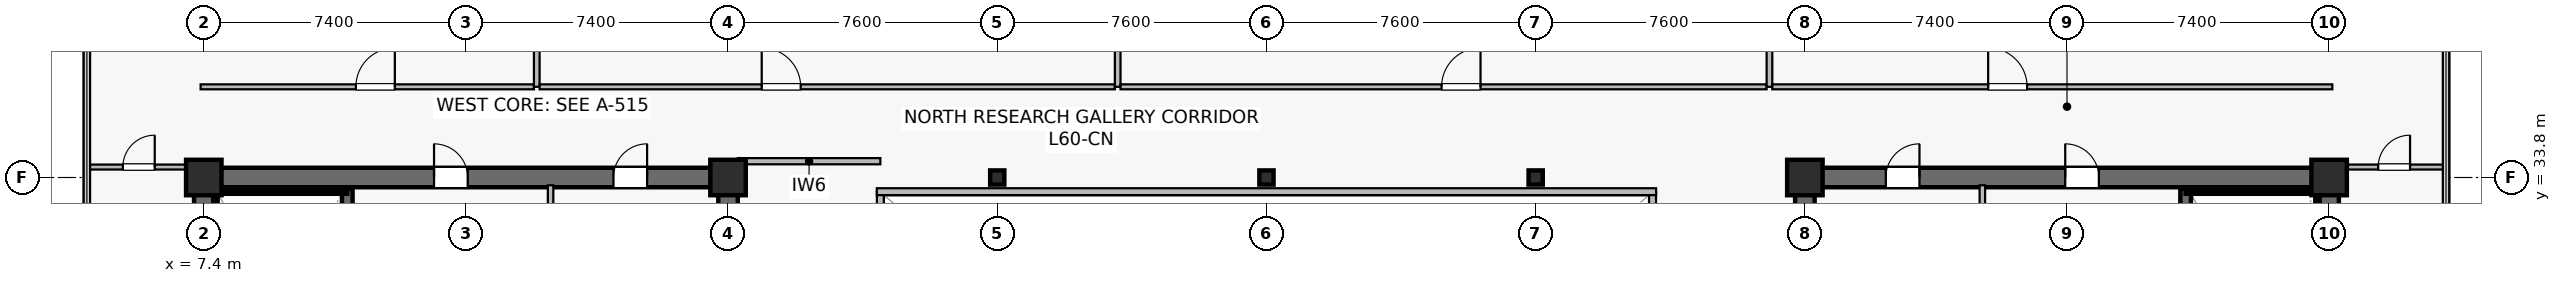
"""IFC4 building model, lengths in metres.
Left out: names, types, materials, properties, quantities, classifications, styles, units other than length and angle.
Written with IfcOpenShell. Run it as: python <this file> out.ifc"""

import sys

from ifc_helpers import new_model, si_unit, direction, frame, frame_2d, origin, origin_2d, place, context, subcontext, project, spatial, rectangle, hollow_rectangle, extrude, source, transform, mapped, element, fill, save


model = new_model("IFC4")
c1 = context("Model", 3, precision=1e-05, world=origin(), true_north=direction((0.0, 1.0)))
c2 = subcontext(c1, "Body", "Model", "MODEL_VIEW")
j1 = project(units=[si_unit("LENGTHUNIT", "METRE"), si_unit("PLANEANGLEUNIT", "RADIAN")], contexts=[c1])
p1 = place(None, origin())
s1 = spatial("IfcSite", under=j1, at=p1, CompositionType="ELEMENT")
p2 = place(p1, origin())
s2 = spatial("IfcBuilding", under=s1, at=p2, CompositionType="ELEMENT")
p3 = place(p2, frame((0.0, 0.0, 250.6)))
s3 = spatial("IfcBuildingStorey", under=s2, at=p3, CompositionType="ELEMENT", Elevation=250.6)
p4 = place(p3, frame((7.125, 33.8, 0.0), z_axis=(0.0, 0.0, 1.0), x_axis=(1.0, 0.0, 0.0)))
e1 = element("IfcWall", 1, at=p4, inside=s3, PredefinedType="SHEAR", context=c2, shape_type="SweptSolid", body=[
    extrude(rectangle(XDim=15.35, YDim=0.55, at=frame_2d((7.675, 0.0))), origin(), (0.0, 0.0, 1.0), 3.8),
])
p5 = place(p4, frame((6.775, 0.0, 0.0)))
e2 = element("IfcOpeningElement", 2, at=p5, cuts=e1, PredefinedType="OPENING", context=c2, shape_type="SweptSolid", body=[
    extrude(rectangle(XDim=0.95, YDim=2.15, at=frame_2d((0.475, 1.075))), frame((0.0, 0.285, 0.0), z_axis=(0.0, -1.0, 0.0), x_axis=(1.0, 0.0, 0.0)), (0.0, 0.0, 1.0), 0.57),
])
p6 = place(p4, frame((11.84, 0.0, 0.0)))
e3 = element("IfcOpeningElement", 3, at=p6, cuts=e1, PredefinedType="OPENING", context=c2, shape_type="SweptSolid", body=[
    extrude(rectangle(XDim=0.95, YDim=2.15, at=frame_2d((0.475, 1.075))), frame((0.0, 0.285, 0.0), z_axis=(0.0, -1.0, 0.0), x_axis=(1.0, 0.0, 0.0)), (0.0, 0.0, 1.0), 0.57),
])
p7 = place(p3, frame((7.4, 15.075, 0.0), z_axis=(0.0, 0.0, 1.0), x_axis=(0.0, 1.0, 0.0)))
e4 = element("IfcWall", 4, at=p7, inside=s3, PredefinedType="SHEAR", context=c2, shape_type="SweptSolid", body=[
    extrude(rectangle(XDim=18.45, YDim=0.55, at=frame_2d((9.225, 0.0))), origin(), (0.0, 0.0, 1.0), 3.8),
])
p8 = place(p3, frame((22.2, 15.075, 0.0), z_axis=(0.0, 0.0, 1.0), x_axis=(0.0, 1.0, 0.0)))
e5 = element("IfcWall", 5, at=p8, inside=s3, PredefinedType="SHEAR", context=c2, shape_type="SweptSolid", body=[
    extrude(rectangle(XDim=18.45, YDim=0.55, at=frame_2d((9.225, 0.0))), origin(), (0.0, 0.0, 1.0), 3.8),
])
p9 = place(p8, frame((3.475, 0.0, 0.0)))
e6 = element("IfcOpeningElement", 6, at=p9, cuts=e5, PredefinedType="OPENING", context=c2, shape_type="SweptSolid", body=[
    extrude(rectangle(XDim=1.42, YDim=2.2, at=frame_2d((0.71, 1.1))), frame((0.0, 0.285, 0.0), z_axis=(0.0, -1.0, 0.0), x_axis=(1.0, 0.0, 0.0)), (0.0, 0.0, 1.0), 0.57),
])
p10 = place(p3, frame((11.45, 24.85, 0.0), z_axis=(0.0, 0.0, 1.0), x_axis=(0.0, 1.0, 0.0)))
e7 = element("IfcWall", 7, at=p10, inside=s3, PredefinedType="SHEAR", context=c2, shape_type="SweptSolid", body=[
    extrude(rectangle(XDim=8.63, YDim=0.3, at=frame_2d((4.315, 0.0))), origin(), (0.0, 0.0, 1.0), 3.8),
])
p11 = place(p10, frame((0.42, 0.0, 0.0)))
e8 = element("IfcOpeningElement", 8, at=p11, cuts=e7, PredefinedType="OPENING", context=c2, shape_type="SweptSolid", body=[
    extrude(rectangle(XDim=1.1, YDim=2.15, at=frame_2d((0.55, 1.075))), frame((0.0, 0.16, 0.0), z_axis=(0.0, -1.0, 0.0), x_axis=(1.0, 0.0, 0.0)), (0.0, 0.0, 1.0), 0.32),
])
p12 = place(p3, frame((7.73, 33.4, 0.0), z_axis=(0.0, 0.0, 1.0), x_axis=(1.0, 0.0, 0.0)))
e9 = element("IfcWall", 9, at=p12, inside=s3, PredefinedType="SOLIDWALL", context=c2, shape_type="SweptSolid", body=[
    extrude(rectangle(XDim=3.72, YDim=0.12, at=frame_2d((1.86, 0.0))), origin(), (0.0, 0.0, 1.0), 3.8),
])
p13 = place(p3, frame((7.73, 25.0, 0.0), z_axis=(0.0, 0.0, 1.0), x_axis=(0.0, 1.0, 0.0)))
e10 = element("IfcWall", 10, at=p13, inside=s3, PredefinedType="SOLIDWALL", context=c2, shape_type="SweptSolid", body=[
    extrude(rectangle(XDim=8.32, YDim=0.12, at=frame_2d((4.16, 0.0))), origin(), (0.0, 0.0, 1.0), 3.8),
])
p14 = place(p3, frame((52.325, 33.8, 0.0), z_axis=(0.0, 0.0, 1.0), x_axis=(1.0, 0.0, 0.0)))
e11 = element("IfcWall", 11, at=p14, inside=s3, PredefinedType="SHEAR", context=c2, shape_type="SweptSolid", body=[
    extrude(rectangle(XDim=15.35, YDim=0.55, at=frame_2d((7.675, 0.0))), origin(), (0.0, 0.0, 1.0), 3.8),
])
p15 = place(p14, frame((7.625, 0.0, 0.0)))
e12 = element("IfcOpeningElement", 12, at=p15, cuts=e11, PredefinedType="OPENING", context=c2, shape_type="SweptSolid", body=[
    extrude(rectangle(XDim=0.95, YDim=2.15, at=frame_2d((0.475, 1.075))), frame((0.0, 0.285, 0.0), z_axis=(0.0, -1.0, 0.0), x_axis=(1.0, 0.0, 0.0)), (0.0, 0.0, 1.0), 0.57),
])
p16 = place(p14, frame((2.56, 0.0, 0.0)))
e13 = element("IfcOpeningElement", 13, at=p16, cuts=e11, PredefinedType="OPENING", context=c2, shape_type="SweptSolid", body=[
    extrude(rectangle(XDim=0.95, YDim=2.15, at=frame_2d((0.475, 1.075))), frame((0.0, 0.285, 0.0), z_axis=(0.0, -1.0, 0.0), x_axis=(1.0, 0.0, 0.0)), (0.0, 0.0, 1.0), 0.57),
])
p17 = place(p3, frame((52.6, 15.075, 0.0), z_axis=(0.0, 0.0, 1.0), x_axis=(0.0, 1.0, 0.0)))
e14 = element("IfcWall", 14, at=p17, inside=s3, PredefinedType="SHEAR", context=c2, shape_type="SweptSolid", body=[
    extrude(rectangle(XDim=18.45, YDim=0.55, at=frame_2d((9.225, 0.0))), origin(), (0.0, 0.0, 1.0), 3.8),
])
p18 = place(p17, frame((3.475, 0.0, 0.0)))
e15 = element("IfcOpeningElement", 15, at=p18, cuts=e14, PredefinedType="OPENING", context=c2, shape_type="SweptSolid", body=[
    extrude(rectangle(XDim=1.42, YDim=2.2, at=frame_2d((0.71, 1.1))), frame((0.0, 0.285, 0.0), z_axis=(0.0, -1.0, 0.0), x_axis=(1.0, 0.0, 0.0)), (0.0, 0.0, 1.0), 0.57),
])
p19 = place(p3, frame((67.4, 15.075, 0.0), z_axis=(0.0, 0.0, 1.0), x_axis=(0.0, 1.0, 0.0)))
e16 = element("IfcWall", 16, at=p19, inside=s3, PredefinedType="SHEAR", context=c2, shape_type="SweptSolid", body=[
    extrude(rectangle(XDim=18.45, YDim=0.55, at=frame_2d((9.225, 0.0))), origin(), (0.0, 0.0, 1.0), 3.8),
])
p20 = place(p3, frame((63.35, 24.85, 0.0), z_axis=(0.0, 0.0, 1.0), x_axis=(0.0, 1.0, 0.0)))
e17 = element("IfcWall", 17, at=p20, inside=s3, PredefinedType="SHEAR", context=c2, shape_type="SweptSolid", body=[
    extrude(rectangle(XDim=8.63, YDim=0.3, at=frame_2d((4.315, 0.0))), origin(), (0.0, 0.0, 1.0), 3.8),
])
p21 = place(p20, frame((0.42, 0.0, 0.0)))
e18 = element("IfcOpeningElement", 18, at=p21, cuts=e17, PredefinedType="OPENING", context=c2, shape_type="SweptSolid", body=[
    extrude(rectangle(XDim=1.1, YDim=2.15, at=frame_2d((0.55, 1.075))), frame((0.0, 0.16, 0.0), z_axis=(0.0, -1.0, 0.0), x_axis=(1.0, 0.0, 0.0)), (0.0, 0.0, 1.0), 0.32),
])
p22 = place(p3, frame((63.35, 33.4, 0.0), z_axis=(0.0, 0.0, 1.0), x_axis=(1.0, 0.0, 0.0)))
e19 = element("IfcWall", 19, at=p22, inside=s3, PredefinedType="SOLIDWALL", context=c2, shape_type="SweptSolid", body=[
    extrude(rectangle(XDim=3.72, YDim=0.12, at=frame_2d((1.86, 0.0))), origin(), (0.0, 0.0, 1.0), 3.8),
])
p23 = place(p3, frame((67.07, 25.0, 0.0), z_axis=(0.0, 0.0, 1.0), x_axis=(0.0, 1.0, 0.0)))
e20 = element("IfcWall", 20, at=p23, inside=s3, PredefinedType="SOLIDWALL", context=c2, shape_type="SweptSolid", body=[
    extrude(rectangle(XDim=8.32, YDim=0.12, at=frame_2d((4.16, 0.0))), origin(), (0.0, 0.0, 1.0), 3.8),
])
m1 = source(origin(), c2, "Body", "SweptSolid", [
    extrude(rectangle(XDim=1.0, YDim=1.0, at=origin_2d()), origin(), (0.0, 0.0, 1.0), 4.1),
])
for number, where, z_axis, x_axis in (
    (21, (7.4, 33.8, 0.0), (0.0, 0.0, 1.0), (1.0, 0.0, 0.0)),
    (22, (22.2, 33.8, 0.0), (0.0, 0.0, 1.0), (1.0, 0.0, 0.0)),
    (23, (52.6, 33.8, 0.0), (0.0, 0.0, 1.0), (1.0, 0.0, 0.0)),
    (24, (67.4, 33.8, 0.0), (0.0, 0.0, 1.0), (1.0, 0.0, 0.0)),
):
    element("IfcColumn", number, at=place(p3, frame(where, z_axis=z_axis, x_axis=x_axis)), inside=s3, PredefinedType="COLUMN", context=c2, shape_type="MappedRepresentation", body=[
        mapped(m1, transform((0.0, 0.0, 0.0), scale=1.0)),
    ])
m2 = source(origin(), c2, "Body", "SweptSolid", [
    extrude(hollow_rectangle(XDim=0.4, YDim=0.4, WallThickness=0.019, at=origin_2d()), origin(), (0.0, 0.0, 1.0), 4.1),
])
for number, where, z_axis, x_axis in (
    (25, (29.8, 33.8, 0.0), (0.0, 0.0, 1.0), (1.0, 0.0, 0.0)),
    (26, (37.4, 33.8, 0.0), (0.0, 0.0, 1.0), (1.0, 0.0, 0.0)),
    (27, (45.0, 33.8, 0.0), (0.0, 0.0, 1.0), (1.0, 0.0, 0.0)),
):
    element("IfcColumn", number, at=place(p3, frame(where, z_axis=z_axis, x_axis=x_axis)), inside=s3, PredefinedType="COLUMN", context=c2, shape_type="MappedRepresentation", body=[
        mapped(m2, transform((0.0, 0.0, 0.0), scale=1.0)),
    ])
for number, where, z_axis, x_axis in (
    (28, (17.19, 29.65, 0.0), (0.0, 0.0, 1.0), (0.0, 1.0, 0.0)),
    (29, (57.61, 29.65, 0.0), (0.0, 0.0, 1.0), (0.0, 1.0, 0.0)),
):
    element("IfcWall", number, at=place(p3, frame(where, z_axis=z_axis, x_axis=x_axis)), inside=s3, PredefinedType="PLUMBINGWALL", context=c2, shape_type="SweptSolid", body=[
        extrude(rectangle(XDim=3.93, YDim=0.155, at=frame_2d((1.965, 0.0))), origin(), (0.0, 0.0, 1.0), 3.8),
    ])
p24 = place(p3, frame((22.475, 34.26, 0.0), z_axis=(0.0, 0.0, 1.0), x_axis=(1.0, 0.0, 0.0)))
e30 = element("IfcWall", 30, at=p24, inside=s3, PredefinedType="PARTITIONING", context=c2, shape_type="SweptSolid", body=[
    extrude(rectangle(XDim=4.025, YDim=0.175, at=frame_2d((2.012, 0.0))), origin(), (0.0, 0.0, 1.0), 3.535),
])
p25 = place(p3, frame((26.5, 15.2, 0.0), z_axis=(0.0, 0.0, 1.0), x_axis=(0.0, 1.0, 0.0)))
e31 = element("IfcWall", 31, at=p25, inside=s3, PredefinedType="SOLIDWALL", context=c2, shape_type="SweptSolid", body=[
    extrude(rectangle(XDim=18.2, YDim=0.195, at=frame_2d((9.1, 0.0))), origin(), (0.0, 0.0, 1.0), 3.8),
])
p26 = place(p25, frame((1.8, 0.0, 0.9)))
e32 = element("IfcOpeningElement", 32, at=p26, cuts=e31, PredefinedType="OPENING", context=c2, shape_type="SweptSolid", body=[
    extrude(rectangle(XDim=1.5, YDim=1.4, at=frame_2d((0.75, 0.7))), frame((0.0, 0.107, 0.0), z_axis=(0.0, -1.0, 0.0), x_axis=(1.0, 0.0, 0.0)), (0.0, 0.0, 1.0), 0.215),
])
p27 = place(p25, frame((13.2, 0.0, 0.9)))
e33 = element("IfcOpeningElement", 33, at=p27, cuts=e31, PredefinedType="OPENING", context=c2, shape_type="SweptSolid", body=[
    extrude(rectangle(XDim=1.5, YDim=1.4, at=frame_2d((0.75, 0.7))), frame((0.0, 0.107, 0.0), z_axis=(0.0, -1.0, 0.0), x_axis=(1.0, 0.0, 0.0)), (0.0, 0.0, 1.0), 0.215),
])
p28 = place(p3, frame((48.3, 15.2, 0.0), z_axis=(0.0, 0.0, 1.0), x_axis=(0.0, 1.0, 0.0)))
e34 = element("IfcWall", 34, at=p28, inside=s3, PredefinedType="SOLIDWALL", context=c2, shape_type="SweptSolid", body=[
    extrude(rectangle(XDim=18.2, YDim=0.195, at=frame_2d((9.1, 0.0))), origin(), (0.0, 0.0, 1.0), 3.8),
])
p29 = place(p28, frame((1.8, 0.0, 0.9)))
e35 = element("IfcOpeningElement", 35, at=p29, cuts=e34, PredefinedType="OPENING", context=c2, shape_type="SweptSolid", body=[
    extrude(rectangle(XDim=1.5, YDim=1.4, at=frame_2d((0.75, 0.7))), frame((0.0, 0.107, 0.0), z_axis=(0.0, -1.0, 0.0), x_axis=(1.0, 0.0, 0.0)), (0.0, 0.0, 1.0), 0.215),
])
p30 = place(p28, frame((13.2, 0.0, 0.9)))
e36 = element("IfcOpeningElement", 36, at=p30, cuts=e34, PredefinedType="OPENING", context=c2, shape_type="SweptSolid", body=[
    extrude(rectangle(XDim=1.5, YDim=1.4, at=frame_2d((0.75, 0.7))), frame((0.0, 0.107, 0.0), z_axis=(0.0, -1.0, 0.0), x_axis=(1.0, 0.0, 0.0)), (0.0, 0.0, 1.0), 0.215),
])
p31 = place(p3, frame((26.4, 33.4, 0.0), z_axis=(0.0, 0.0, 1.0), x_axis=(1.0, 0.0, 0.0)))
e37 = element("IfcWall", 37, at=p31, inside=s3, PredefinedType="SOLIDWALL", context=c2, shape_type="SweptSolid", body=[
    extrude(rectangle(XDim=22.0, YDim=0.195, at=frame_2d((11.0, 0.0))), origin(), (0.0, 0.0, 1.0), 3.8),
])
p32 = place(p3, frame((7.31, 36.36, 0.0), z_axis=(0.0, 0.0, 1.0), x_axis=(1.0, 0.0, 0.0)))
e38 = element("IfcWall", 38, at=p32, inside=s3, PredefinedType="PARTITIONING", context=c2, shape_type="SweptSolid", body=[
    extrude(rectangle(XDim=9.41, YDim=0.14, at=frame_2d((4.705, 0.0))), origin(), (0.0, 0.0, 1.0), 3.197),
])
p33 = place(p32, frame((4.383, 0.0, 0.0)))
e39 = element("IfcOpeningElement", 39, at=p33, cuts=e38, PredefinedType="OPENING", context=c2, shape_type="SweptSolid", body=[
    extrude(rectangle(XDim=1.1, YDim=2.18, at=frame_2d((0.55, 1.09))), frame((0.0, 0.08, 0.0), z_axis=(0.0, -1.0, 0.0), x_axis=(1.0, 0.0, 0.0)), (0.0, 0.0, 1.0), 0.16),
])
p34 = place(p3, frame((16.8, 36.36, 0.0), z_axis=(0.0, 0.0, 1.0), x_axis=(0.0, 1.0, 0.0)))
e40 = element("IfcWall", 40, at=p34, inside=s3, PredefinedType="PARTITIONING", context=c2, shape_type="SweptSolid", body=[
    extrude(rectangle(XDim=9.53, YDim=0.16, at=frame_2d((4.765, 0.0))), origin(), (0.0, 0.0, 1.0), 3.135),
])
p35 = place(p3, frame((16.88, 36.36, 0.0), z_axis=(0.0, 0.0, 1.0), x_axis=(1.0, 0.0, 0.0)))
e41 = element("IfcWall", 41, at=p35, inside=s3, PredefinedType="PARTITIONING", context=c2, shape_type="SweptSolid", body=[
    extrude(rectangle(XDim=16.24, YDim=0.14, at=frame_2d((8.12, 0.0))), origin(), (0.0, 0.0, 1.0), 3.197),
])
p36 = place(p35, frame((6.271, 0.0, 0.0)))
e42 = element("IfcOpeningElement", 42, at=p36, cuts=e41, PredefinedType="OPENING", context=c2, shape_type="SweptSolid", body=[
    extrude(rectangle(XDim=1.1, YDim=2.18, at=frame_2d((0.55, 1.09))), frame((0.0, 0.08, 0.0), z_axis=(0.0, -1.0, 0.0), x_axis=(1.0, 0.0, 0.0)), (0.0, 0.0, 1.0), 0.16),
])
p37 = place(p3, frame((33.2, 36.36, 0.0), z_axis=(0.0, 0.0, 1.0), x_axis=(0.0, 1.0, 0.0)))
e43 = element("IfcWall", 43, at=p37, inside=s3, PredefinedType="PARTITIONING", context=c2, shape_type="SweptSolid", body=[
    extrude(rectangle(XDim=8.33, YDim=0.16, at=frame_2d((4.165, 0.0))), origin(), (0.0, 0.0, 1.0), 3.135),
])
p38 = place(p3, frame((33.28, 36.36, 0.0), z_axis=(0.0, 0.0, 1.0), x_axis=(1.0, 0.0, 0.0)))
e44 = element("IfcWall", 44, at=p38, inside=s3, PredefinedType="PARTITIONING", context=c2, shape_type="SweptSolid", body=[
    extrude(rectangle(XDim=18.24, YDim=0.14, at=frame_2d((9.12, 0.0))), origin(), (0.0, 0.0, 1.0), 3.197),
])
p39 = place(p38, frame((9.063, 0.0, 0.0)))
e45 = element("IfcOpeningElement", 45, at=p39, cuts=e44, PredefinedType="OPENING", context=c2, shape_type="SweptSolid", body=[
    extrude(rectangle(XDim=1.1, YDim=2.18, at=frame_2d((0.55, 1.09))), frame((0.0, 0.08, 0.0), z_axis=(0.0, -1.0, 0.0), x_axis=(1.0, 0.0, 0.0)), (0.0, 0.0, 1.0), 0.16),
])
p40 = place(p3, frame((51.6, 36.36, 0.0), z_axis=(0.0, 0.0, 1.0), x_axis=(0.0, 1.0, 0.0)))
e46 = element("IfcWall", 46, at=p40, inside=s3, PredefinedType="PARTITIONING", context=c2, shape_type="SweptSolid", body=[
    extrude(rectangle(XDim=9.53, YDim=0.16, at=frame_2d((4.765, 0.0))), origin(), (0.0, 0.0, 1.0), 3.135),
])
p41 = place(p3, frame((51.68, 36.36, 0.0), z_axis=(0.0, 0.0, 1.0), x_axis=(1.0, 0.0, 0.0)))
e47 = element("IfcWall", 47, at=p41, inside=s3, PredefinedType="PARTITIONING", context=c2, shape_type="SweptSolid", body=[
    extrude(rectangle(XDim=15.81, YDim=0.14, at=frame_2d((7.905, 0.0))), origin(), (0.0, 0.0, 1.0), 3.197),
])
p42 = place(p41, frame((6.094, 0.0, 0.0)))
e48 = element("IfcOpeningElement", 48, at=p42, cuts=e47, PredefinedType="OPENING", context=c2, shape_type="SweptSolid", body=[
    extrude(rectangle(XDim=1.1, YDim=2.18, at=frame_2d((0.55, 1.09))), frame((0.0, 0.08, 0.0), z_axis=(0.0, -1.0, 0.0), x_axis=(1.0, 0.0, 0.0)), (0.0, 0.0, 1.0), 0.16),
])
p43 = place(p3, frame((4.11, 34.095, 0.0), z_axis=(0.0, 0.0, 1.0), x_axis=(1.0, 0.0, 0.0)))
e49 = element("IfcWall", 49, at=p43, inside=s3, PredefinedType="PARTITIONING", context=c2, shape_type="SweptSolid", body=[
    extrude(rectangle(XDim=2.91, YDim=0.14, at=frame_2d((1.455, 0.0))), origin(), (0.0, 0.0, 1.0), 3.8),
])
p44 = place(p43, frame((1.005, 0.0, 0.0)))
e50 = element("IfcOpeningElement", 50, at=p44, cuts=e49, PredefinedType="OPENING", context=c2, shape_type="SweptSolid", body=[
    extrude(rectangle(XDim=0.9, YDim=2.1, at=frame_2d((0.45, 1.05))), frame((0.0, 0.08, 0.0), z_axis=(0.0, -1.0, 0.0), x_axis=(1.0, 0.0, 0.0)), (0.0, 0.0, 1.0), 0.16),
])
p45 = place(p3, frame((67.78, 34.095, 0.0), z_axis=(0.0, 0.0, 1.0), x_axis=(1.0, 0.0, 0.0)))
e51 = element("IfcWall", 51, at=p45, inside=s3, PredefinedType="PARTITIONING", context=c2, shape_type="SweptSolid", body=[
    extrude(rectangle(XDim=2.91, YDim=0.14, at=frame_2d((1.455, 0.0))), origin(), (0.0, 0.0, 1.0), 3.8),
])
p46 = place(p45, frame((1.005, 0.0, 0.0)))
e52 = element("IfcOpeningElement", 52, at=p46, cuts=e51, PredefinedType="OPENING", context=c2, shape_type="SweptSolid", body=[
    extrude(rectangle(XDim=0.9, YDim=2.1, at=frame_2d((0.45, 1.05))), frame((0.0, 0.08, 0.0), z_axis=(0.0, -1.0, 0.0), x_axis=(1.0, 0.0, 0.0)), (0.0, 0.0, 1.0), 0.16),
])
m3 = source(origin(), c2, "Body", "SweptSolid", [
    extrude(rectangle(XDim=0.95, YDim=2.15, at=frame_2d((0.475, 1.075))), frame((0.0, 0.025, 0.0), z_axis=(0.0, -1.0, 0.0), x_axis=(1.0, 0.0, 0.0)), (0.0, 0.0, 1.0), 0.05),
])
p47 = place(p5, origin())
e53 = element("IfcDoor", 53, at=p47, inside=s3, OperationType="SINGLE_SWING_LEFT", PredefinedType="DOOR", context=c2, shape_type="MappedRepresentation", body=[
    mapped(m3, transform((0.0, 0.0, 0.0), scale=1.0)),
])
fill(e2, e53)
p48 = place(p6, origin())
e54 = element("IfcDoor", 54, at=p48, inside=s3, OperationType="SINGLE_SWING_RIGHT", PredefinedType="DOOR", context=c2, shape_type="MappedRepresentation", body=[
    mapped(m3, transform((0.0, 0.0, 0.0), scale=1.0)),
])
fill(e3, e54)
p49 = place(p15, origin())
e55 = element("IfcDoor", 55, at=p49, inside=s3, OperationType="SINGLE_SWING_LEFT", PredefinedType="DOOR", context=c2, shape_type="MappedRepresentation", body=[
    mapped(m3, transform((0.0, 0.0, 0.0), scale=1.0)),
])
fill(e12, e55)
p50 = place(p16, origin())
e56 = element("IfcDoor", 56, at=p50, inside=s3, OperationType="SINGLE_SWING_RIGHT", PredefinedType="DOOR", context=c2, shape_type="MappedRepresentation", body=[
    mapped(m3, transform((0.0, 0.0, 0.0), scale=1.0)),
])
fill(e13, e56)
m4 = source(origin(), c2, "Body", "SweptSolid", [
    extrude(rectangle(XDim=1.1, YDim=2.18, at=frame_2d((0.55, 1.09))), frame((0.0, 0.025, 0.0), z_axis=(0.0, -1.0, 0.0), x_axis=(1.0, 0.0, 0.0)), (0.0, 0.0, 1.0), 0.05),
])
p51 = place(p33, origin())
e57 = element("IfcDoor", 57, at=p51, inside=s3, OperationType="SINGLE_SWING_RIGHT", PredefinedType="DOOR", context=c2, shape_type="MappedRepresentation", body=[
    mapped(m4, transform((0.0, 0.0, 0.0), scale=1.0)),
])
fill(e39, e57)
p52 = place(p36, origin())
e58 = element("IfcDoor", 58, at=p52, inside=s3, OperationType="SINGLE_SWING_LEFT", PredefinedType="DOOR", context=c2, shape_type="MappedRepresentation", body=[
    mapped(m4, transform((0.0, 0.0, 0.0), scale=1.0)),
])
fill(e42, e58)
p53 = place(p39, origin())
e59 = element("IfcDoor", 59, at=p53, inside=s3, OperationType="SINGLE_SWING_RIGHT", PredefinedType="DOOR", context=c2, shape_type="MappedRepresentation", body=[
    mapped(m4, transform((0.0, 0.0, 0.0), scale=1.0)),
])
fill(e45, e59)
p54 = place(p42, origin())
e60 = element("IfcDoor", 60, at=p54, inside=s3, OperationType="SINGLE_SWING_LEFT", PredefinedType="DOOR", context=c2, shape_type="MappedRepresentation", body=[
    mapped(m4, transform((0.0, 0.0, 0.0), scale=1.0)),
])
fill(e48, e60)
m5 = source(origin(), c2, "Body", "SweptSolid", [
    extrude(rectangle(XDim=0.9, YDim=2.1, at=frame_2d((0.45, 1.05))), frame((0.0, 0.025, 0.0), z_axis=(0.0, -1.0, 0.0), x_axis=(1.0, 0.0, 0.0)), (0.0, 0.0, 1.0), 0.05),
])
p55 = place(p44, origin())
e61 = element("IfcDoor", 61, at=p55, inside=s3, OperationType="SINGLE_SWING_RIGHT", PredefinedType="DOOR", context=c2, shape_type="MappedRepresentation", body=[
    mapped(m5, transform((0.0, 0.0, 0.0), scale=1.0)),
])
fill(e50, e61)
p56 = place(p46, origin())
e62 = element("IfcDoor", 62, at=p56, inside=s3, OperationType="SINGLE_SWING_RIGHT", PredefinedType="DOOR", context=c2, shape_type="MappedRepresentation", body=[
    mapped(m5, transform((0.0, 0.0, 0.0), scale=1.0)),
])
fill(e52, e62)
save(model, sys.argv[1])
